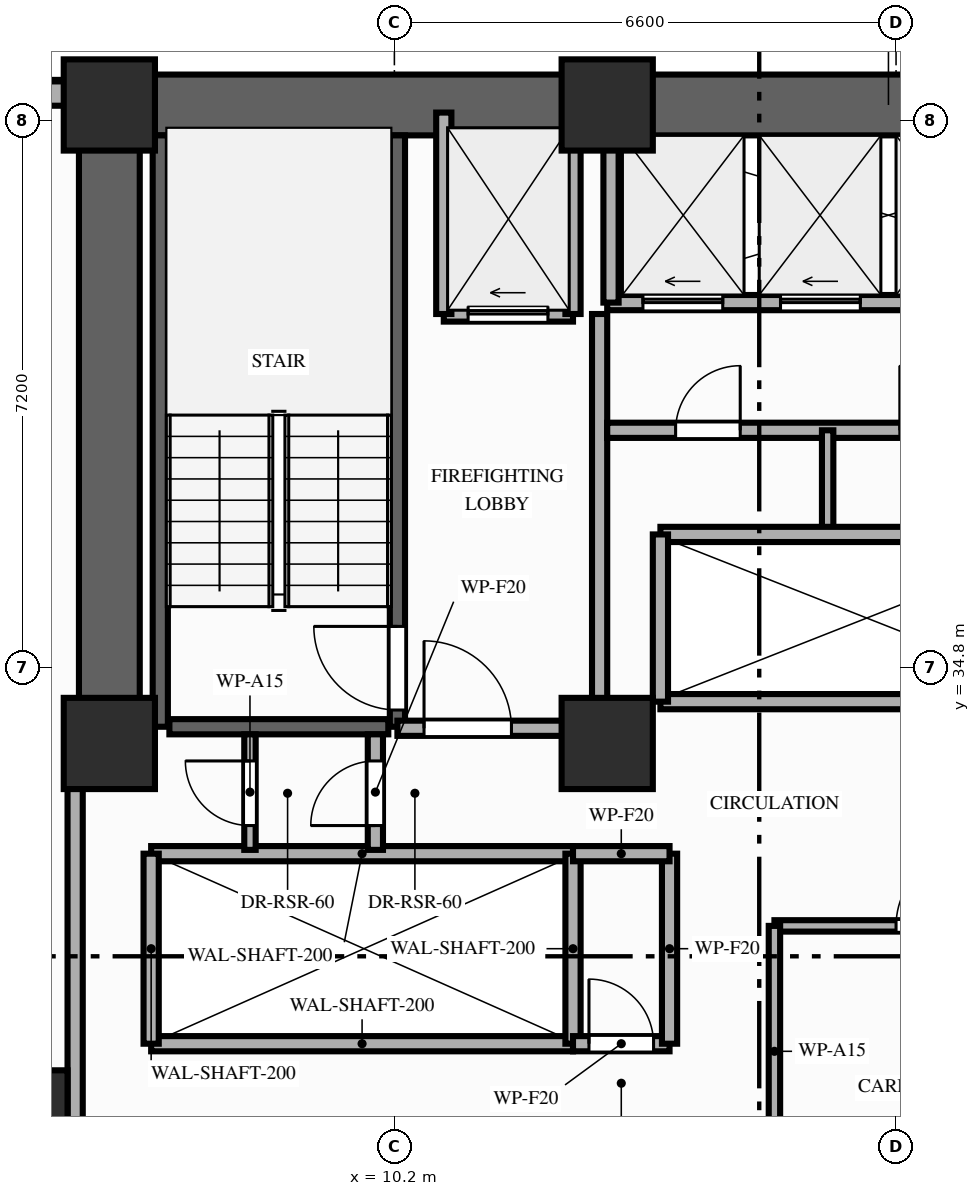
"""IFC4 building model, lengths in metres.
Left out: names, types, materials, properties, quantities, classifications, styles, units other than length and angle.
Written with IfcOpenShell. Run it as: python <this file> out.ifc"""

import sys

from ifc_helpers import new_model, si_unit, direction, frame, frame_2d, origin, origin_2d, place, context, subcontext, project, spatial, rectangle, extrude, element, fill, save


model = new_model("IFC4")
c1 = context("Model", 3, precision=1e-05, world=origin(), true_north=direction((0.0, 1.0)))
c2 = subcontext(c1, "Body", "Model", "MODEL_VIEW")
j1 = project(units=[si_unit("LENGTHUNIT", "METRE"), si_unit("PLANEANGLEUNIT", "RADIAN")], contexts=[c1])
p1 = place(None, origin())
s1 = spatial("IfcSite", under=j1, at=p1, CompositionType="ELEMENT")
p2 = place(p1, origin())
s2 = spatial("IfcBuilding", under=s1, at=p2, CompositionType="ELEMENT")
p3 = place(p2, frame((0.0, 0.0, 33.4)))
s3 = spatial("IfcBuildingStorey", under=s2, at=p3, CompositionType="ELEMENT", Elevation=33.4)
for number, where, z_axis, x_axis in (
    (1, (6.45, 33.8, 0.0), (0.0, 0.0, 1.0), (1.0, 0.0, 0.0)),
    (2, (13.0, 33.8, 0.0), (0.0, 0.0, 1.0), (1.0, 0.0, 0.0)),
    (3, (6.45, 42.2, 0.0), (0.0, 0.0, 1.0), (1.0, 0.0, 0.0)),
    (4, (13.0, 42.2, 0.0), (0.0, 0.0, 1.0), (1.0, 0.0, 0.0)),
):
    element("IfcColumn", number, at=place(p3, frame(where, z_axis=z_axis, x_axis=x_axis)), inside=s3, PredefinedType="COLUMN", context=c2, shape_type="SweptSolid", body=[
        extrude(rectangle(XDim=1.2, YDim=1.2, at=origin_2d()), origin(), (0.0, 0.0, 1.0), 3.2),
    ])
p4 = place(p3, frame((5.4, 28.8, 0.0), z_axis=(0.0, 0.0, 1.0), x_axis=(1.0, 0.0, 0.0)))
e5 = element("IfcColumn", 5, at=p4, inside=s3, PredefinedType="COLUMN", context=c2, shape_type="SweptSolid", body=[
    extrude(rectangle(XDim=1.0, YDim=1.4, at=origin_2d()), origin(), (0.0, 0.0, 1.0), 3.2),
])
p5 = place(p3, frame((6.0, 42.35, 0.0), z_axis=(0.0, 0.0, 1.0), x_axis=(-1.0, 0.0, 0.0)))
e6 = element("IfcWall", 6, at=p5, inside=s3, PredefinedType="STANDARD", context=c2, shape_type="SweptSolid", body=[
    extrude(rectangle(XDim=2.0, YDim=0.32, at=frame_2d((1.0, 0.0))), origin(), (0.0, 0.0, 1.0), 3.02),
])
p6 = place(p3, frame((6.45, 42.2, 0.0), z_axis=(0.0, 0.0, 1.0), x_axis=(1.0, 0.0, 0.0)))
e7 = element("IfcWall", 7, at=p6, inside=s3, PredefinedType="SHEAR", context=c2, shape_type="SweptSolid", body=[
    extrude(rectangle(XDim=20.45, YDim=0.8, at=frame_2d((10.225, 0.0))), origin(), (0.0, 0.0, 1.0), 3.02),
])
p7 = place(p3, frame((6.45, 33.8, 0.0), z_axis=(0.0, 0.0, 1.0), x_axis=(0.0, 1.0, 0.0)))
e8 = element("IfcWall", 8, at=p7, inside=s3, PredefinedType="SHEAR", context=c2, shape_type="SweptSolid", body=[
    extrude(rectangle(XDim=7.95, YDim=0.8, at=frame_2d((3.975, 0.0))), origin(), (0.0, 0.0, 1.0), 3.02),
])
p8 = place(p3, frame((7.12, 34.02, 0.0), z_axis=(0.0, 0.0, 1.0), x_axis=(0.0, 1.0, 0.0)))
e9 = element("IfcWall", 9, at=p8, inside=s3, PredefinedType="SHEAR", context=c2, shape_type="SweptSolid", body=[
    extrude(rectangle(XDim=7.78, YDim=0.2, at=frame_2d((3.89, 0.0))), origin(), (0.0, 0.0, 1.0), 3.02),
])
p9 = place(p3, frame((10.24, 34.02, 0.0), z_axis=(0.0, 0.0, 1.0), x_axis=(0.0, 1.0, 0.0)))
e10 = element("IfcWall", 10, at=p9, inside=s3, PredefinedType="SHEAR", context=c2, shape_type="SweptSolid", body=[
    extrude(rectangle(XDim=7.78, YDim=0.2, at=frame_2d((3.89, 0.0))), origin(), (0.0, 0.0, 1.0), 3.02),
])
p10 = place(p9, frame((0.22, 0.0, 0.0)))
e11 = element("IfcOpeningElement", 11, at=p10, cuts=e10, PredefinedType="OPENING", context=c2, shape_type="SweptSolid", body=[
    extrude(rectangle(XDim=1.1, YDim=2.15, at=frame_2d((0.55, 1.075))), frame((0.0, 0.11, 0.0), z_axis=(0.0, -1.0, 0.0), x_axis=(1.0, 0.0, 0.0)), (0.0, 0.0, 1.0), 0.22),
])
p11 = place(p3, frame((7.24, 34.02, 0.0), z_axis=(0.0, 0.0, 1.0), x_axis=(1.0, 0.0, 0.0)))
e12 = element("IfcWall", 12, at=p11, inside=s3, PredefinedType="SHEAR", context=c2, shape_type="SweptSolid", body=[
    extrude(rectangle(XDim=2.88, YDim=0.2, at=frame_2d((1.44, 0.0))), origin(), (0.0, 0.0, 1.0), 3.02),
])
for number, where, z_axis, x_axis in (
    (13, (7.0, 29.85, 0.0), (0.0, 0.0, 1.0), (1.0, 0.0, 0.0)),
    (14, (7.0, 32.35, 0.0), (0.0, 0.0, 1.0), (1.0, 0.0, 0.0)),
):
    element("IfcWall", number, at=place(p3, frame(where, z_axis=z_axis, x_axis=x_axis)), inside=s3, PredefinedType="MOVABLE", context=c2, shape_type="SweptSolid", body=[
        extrude(rectangle(XDim=5.55, YDim=0.2, at=frame_2d((2.775, 0.0))), origin(), (0.0, 0.0, 1.0), 3.02),
    ])
for number, where, z_axis, x_axis in (
    (15, (7.0, 29.85, 0.0), (0.0, 0.0, 1.0), (0.0, 1.0, 0.0)),
    (16, (12.55, 29.85, 0.0), (0.0, 0.0, 1.0), (0.0, 1.0, 0.0)),
):
    element("IfcWall", number, at=place(p3, frame(where, z_axis=z_axis, x_axis=x_axis)), inside=s3, PredefinedType="MOVABLE", context=c2, shape_type="SweptSolid", body=[
        extrude(rectangle(XDim=2.5, YDim=0.2, at=frame_2d((1.25, 0.0))), origin(), (0.0, 0.0, 1.0), 3.02),
    ])
p12 = place(p3, frame((10.85, 39.45, 0.0), z_axis=(0.0, 0.0, 1.0), x_axis=(1.0, 0.0, 0.0)))
e17 = element("IfcWall", 17, at=p12, inside=s3, PredefinedType="MOVABLE", context=c2, shape_type="SweptSolid", body=[
    extrude(rectangle(XDim=1.7, YDim=0.2, at=frame_2d((0.85, 0.0))), origin(), (0.0, 0.0, 1.0), 3.02),
])
p13 = place(p12, frame((0.32, 0.0, 0.0)))
e18 = element("IfcOpeningElement", 18, at=p13, cuts=e17, PredefinedType="OPENING", context=c2, shape_type="SweptSolid", body=[
    extrude(rectangle(XDim=1.05, YDim=2.15, at=frame_2d((0.525, 1.075))), frame((0.0, 0.11, 0.0), z_axis=(0.0, -1.0, 0.0), x_axis=(1.0, 0.0, 0.0)), (0.0, 0.0, 1.0), 0.22),
])
for number, where, z_axis, x_axis in (
    (19, (10.85, 39.45, 0.0), (0.0, 0.0, 1.0), (0.0, 1.0, 0.0)),
    (20, (12.55, 39.45, 0.0), (0.0, 0.0, 1.0), (0.0, 1.0, 0.0)),
):
    element("IfcWall", number, at=place(p3, frame(where, z_axis=z_axis, x_axis=x_axis)), inside=s3, PredefinedType="MOVABLE", context=c2, shape_type="SweptSolid", body=[
        extrude(rectangle(XDim=2.65, YDim=0.2, at=frame_2d((1.325, 0.0))), origin(), (0.0, 0.0, 1.0), 2.4),
    ])
p14 = place(p3, frame((12.9, 34.0, 0.0), z_axis=(0.0, 0.0, 1.0), x_axis=(0.0, 1.0, 0.0)))
e21 = element("IfcWall", 21, at=p14, inside=s3, PredefinedType="PARTITIONING", context=c2, shape_type="SweptSolid", body=[
    extrude(rectangle(XDim=5.45, YDim=0.2, at=frame_2d((2.725, 0.0))), origin(), (0.0, 0.0, 1.0), 2.4),
])
p15 = place(p3, frame((10.24, 34.0, 0.0), z_axis=(0.0, 0.0, 1.0), x_axis=(1.0, 0.0, 0.0)))
e22 = element("IfcWall", 22, at=p15, inside=s3, PredefinedType="PARTITIONING", context=c2, shape_type="SweptSolid", body=[
    extrude(rectangle(XDim=2.66, YDim=0.2, at=frame_2d((1.33, 0.0))), origin(), (0.0, 0.0, 1.0), 2.4),
])
p16 = place(p15, frame((0.35, 0.0, 0.0)))
e23 = element("IfcOpeningElement", 23, at=p16, cuts=e22, PredefinedType="OPENING", context=c2, shape_type="SweptSolid", body=[
    extrude(rectangle(XDim=1.15, YDim=2.15, at=frame_2d((0.575, 1.075))), frame((0.0, 0.11, 0.0), z_axis=(0.0, -1.0, 0.0), x_axis=(1.0, 0.0, 0.0)), (0.0, 0.0, 1.0), 0.22),
])
p17 = place(p3, frame((9.95, 32.4, 0.0), z_axis=(0.0, 0.0, 1.0), x_axis=(0.0, 1.0, 0.0)))
e24 = element("IfcWall", 24, at=p17, inside=s3, PredefinedType="PARTITIONING", context=c2, shape_type="SweptSolid", body=[
    extrude(rectangle(XDim=1.52, YDim=0.2, at=frame_2d((0.76, 0.0))), origin(), (0.0, 0.0, 1.0), 2.4),
])
p18 = place(p17, frame((0.32, 0.0, 0.0)))
e25 = element("IfcOpeningElement", 25, at=p18, cuts=e24, PredefinedType="OPENING", context=c2, shape_type="SweptSolid", body=[
    extrude(rectangle(XDim=0.85, YDim=2.05, at=frame_2d((0.425, 1.025))), frame((0.0, 0.11, 0.0), z_axis=(0.0, -1.0, 0.0), x_axis=(1.0, 0.0, 0.0)), (0.0, 0.0, 1.0), 0.22),
])
p19 = place(p3, frame((8.3, 32.4, 0.0), z_axis=(0.0, 0.0, 1.0), x_axis=(0.0, 1.0, 0.0)))
e26 = element("IfcWall", 26, at=p19, inside=s3, PredefinedType="PARTITIONING", context=c2, shape_type="SweptSolid", body=[
    extrude(rectangle(XDim=1.52, YDim=0.15, at=frame_2d((0.76, 0.0))), origin(), (0.0, 0.0, 1.0), 2.4),
])
p20 = place(p19, frame((0.32, 0.0, 0.0)))
e27 = element("IfcOpeningElement", 27, at=p20, cuts=e26, PredefinedType="OPENING", context=c2, shape_type="SweptSolid", body=[
    extrude(rectangle(XDim=0.85, YDim=2.05, at=frame_2d((0.425, 1.025))), frame((0.0, 0.085, 0.0), z_axis=(0.0, -1.0, 0.0), x_axis=(1.0, 0.0, 0.0)), (0.0, 0.0, 1.0), 0.17),
])
p21 = place(p3, frame((12.55, 29.85, 0.0), z_axis=(0.0, 0.0, 1.0), x_axis=(1.0, 0.0, 0.0)))
e28 = element("IfcWall", 28, at=p21, inside=s3, PredefinedType="PARTITIONING", context=c2, shape_type="SweptSolid", body=[
    extrude(rectangle(XDim=1.27, YDim=0.2, at=frame_2d((0.635, 0.0))), origin(), (0.0, 0.0, 1.0), 3.02),
])
p22 = place(p21, frame((0.21, 0.0, 0.0)))
e29 = element("IfcOpeningElement", 29, at=p22, cuts=e28, PredefinedType="OPENING", context=c2, shape_type="SweptSolid", body=[
    extrude(rectangle(XDim=0.85, YDim=2.05, at=frame_2d((0.425, 1.025))), frame((0.0, 0.11, 0.0), z_axis=(0.0, -1.0, 0.0), x_axis=(1.0, 0.0, 0.0)), (0.0, 0.0, 1.0), 0.22),
])
p23 = place(p3, frame((13.82, 29.85, 0.0), z_axis=(0.0, 0.0, 1.0), x_axis=(0.0, 1.0, 0.0)))
e30 = element("IfcWall", 30, at=p23, inside=s3, PredefinedType="PARTITIONING", context=c2, shape_type="SweptSolid", body=[
    extrude(rectangle(XDim=2.5, YDim=0.2, at=frame_2d((1.25, 0.0))), origin(), (0.0, 0.0, 1.0), 3.02),
])
p24 = place(p3, frame((12.55, 32.35, 0.0), z_axis=(0.0, 0.0, 1.0), x_axis=(1.0, 0.0, 0.0)))
e31 = element("IfcWall", 31, at=p24, inside=s3, PredefinedType="PARTITIONING", context=c2, shape_type="SweptSolid", body=[
    extrude(rectangle(XDim=1.27, YDim=0.2, at=frame_2d((0.635, 0.0))), origin(), (0.0, 0.0, 1.0), 3.02),
])
p25 = place(p3, frame((13.0, 39.6, 0.0), z_axis=(0.0, 0.0, 1.0), x_axis=(1.0, 0.0, 0.0)))
e32 = element("IfcWall", 32, at=p25, inside=s3, PredefinedType="MOVABLE", context=c2, shape_type="SweptSolid", body=[
    extrude(rectangle(XDim=7.4, YDim=0.2, at=frame_2d((3.7, 0.0))), origin(), (0.0, 0.0, 1.0), 3.02),
])
p26 = place(p25, frame((0.47, 0.0, 0.0)))
e33 = element("IfcOpeningElement", 33, at=p26, cuts=e32, PredefinedType="OPENING", context=c2, shape_type="SweptSolid", body=[
    extrude(rectangle(XDim=1.05, YDim=2.15, at=frame_2d((0.525, 1.075))), frame((0.0, 0.11, 0.0), z_axis=(0.0, -1.0, 0.0), x_axis=(1.0, 0.0, 0.0)), (0.0, 0.0, 1.0), 0.22),
])
p27 = place(p25, frame((2.28, 0.0, 0.0)))
e34 = element("IfcOpeningElement", 34, at=p27, cuts=e32, PredefinedType="OPENING", context=c2, shape_type="SweptSolid", body=[
    extrude(rectangle(XDim=1.05, YDim=2.15, at=frame_2d((0.525, 1.075))), frame((0.0, 0.11, 0.0), z_axis=(0.0, -1.0, 0.0), x_axis=(1.0, 0.0, 0.0)), (0.0, 0.0, 1.0), 0.22),
])
p28 = place(p25, frame((4.08, 0.0, 0.0)))
e35 = element("IfcOpeningElement", 35, at=p28, cuts=e32, PredefinedType="OPENING", context=c2, shape_type="SweptSolid", body=[
    extrude(rectangle(XDim=1.05, YDim=2.15, at=frame_2d((0.525, 1.075))), frame((0.0, 0.11, 0.0), z_axis=(0.0, -1.0, 0.0), x_axis=(1.0, 0.0, 0.0)), (0.0, 0.0, 1.0), 0.22),
])
p29 = place(p25, frame((5.88, 0.0, 0.0)))
e36 = element("IfcOpeningElement", 36, at=p29, cuts=e32, PredefinedType="OPENING", context=c2, shape_type="SweptSolid", body=[
    extrude(rectangle(XDim=1.05, YDim=2.15, at=frame_2d((0.525, 1.075))), frame((0.0, 0.11, 0.0), z_axis=(0.0, -1.0, 0.0), x_axis=(1.0, 0.0, 0.0)), (0.0, 0.0, 1.0), 0.22),
])
p30 = place(p3, frame((13.05, 39.6, 0.0), z_axis=(0.0, 0.0, 1.0), x_axis=(0.0, 1.0, 0.0)))
e37 = element("IfcWall", 37, at=p30, inside=s3, PredefinedType="MOVABLE", context=c2, shape_type="SweptSolid", body=[
    extrude(rectangle(XDim=2.18, YDim=0.2, at=frame_2d((1.09, 0.0))), origin(), (0.0, 0.0, 1.0), 3.02),
])
p31 = place(p3, frame((13.0, 37.92, 0.0), z_axis=(0.0, 0.0, 1.0), x_axis=(1.0, 0.0, 0.0)))
e38 = element("IfcWall", 38, at=p31, inside=s3, PredefinedType="PARTITIONING", context=c2, shape_type="SweptSolid", body=[
    extrude(rectangle(XDim=5.95, YDim=0.2, at=frame_2d((2.975, 0.0))), origin(), (0.0, 0.0, 1.0), 3.02),
])
p32 = place(p31, frame((0.9, 0.0, 0.0)))
e39 = element("IfcOpeningElement", 39, at=p32, cuts=e38, PredefinedType="OPENING", context=c2, shape_type="SweptSolid", body=[
    extrude(rectangle(XDim=0.85, YDim=2.05, at=frame_2d((0.425, 1.025))), frame((0.0, 0.11, 0.0), z_axis=(0.0, -1.0, 0.0), x_axis=(1.0, 0.0, 0.0)), (0.0, 0.0, 1.0), 0.22),
])
p33 = place(p31, frame((3.85, 0.0, 0.0)))
e40 = element("IfcOpeningElement", 40, at=p33, cuts=e38, PredefinedType="OPENING", context=c2, shape_type="SweptSolid", body=[
    extrude(rectangle(XDim=0.85, YDim=2.05, at=frame_2d((0.425, 1.025))), frame((0.0, 0.11, 0.0), z_axis=(0.0, -1.0, 0.0), x_axis=(1.0, 0.0, 0.0)), (0.0, 0.0, 1.0), 0.22),
])
p34 = place(p3, frame((15.9, 36.6, 0.0), z_axis=(0.0, 0.0, 1.0), x_axis=(0.0, 1.0, 0.0)))
e41 = element("IfcWall", 41, at=p34, inside=s3, PredefinedType="PARTITIONING", context=c2, shape_type="SweptSolid", body=[
    extrude(rectangle(XDim=1.32, YDim=0.15, at=frame_2d((0.66, 0.0))), origin(), (0.0, 0.0, 1.0), 3.02),
])
for number, where, z_axis, x_axis in (
    (42, (13.7, 34.35, 0.0), (0.0, 0.0, 1.0), (1.0, 0.0, 0.0)),
    (43, (13.7, 36.55, 0.0), (0.0, 0.0, 1.0), (1.0, 0.0, 0.0)),
):
    element("IfcWall", number, at=place(p3, frame(where, z_axis=z_axis, x_axis=x_axis)), inside=s3, PredefinedType="MOVABLE", context=c2, shape_type="SweptSolid", body=[
        extrude(rectangle(XDim=5.42, YDim=0.2, at=frame_2d((2.71, 0.0))), origin(), (0.0, 0.0, 1.0), 3.02),
    ])
p35 = place(p3, frame((13.7, 34.35, 0.0), z_axis=(0.0, 0.0, 1.0), x_axis=(0.0, 1.0, 0.0)))
e44 = element("IfcWall", 44, at=p35, inside=s3, PredefinedType="MOVABLE", context=c2, shape_type="SweptSolid", body=[
    extrude(rectangle(XDim=2.2, YDim=0.2, at=frame_2d((1.1, 0.0))), origin(), (0.0, 0.0, 1.0), 3.02),
])
p36 = place(p3, frame((6.0, 28.1, 0.0), z_axis=(0.0, 0.0, 1.0), x_axis=(0.0, 1.0, 0.0)))
e45 = element("IfcWall", 45, at=p36, inside=s3, PredefinedType="PARTITIONING", context=c2, shape_type="SweptSolid", body=[
    extrude(rectangle(XDim=5.58, YDim=0.2, at=frame_2d((2.79, 0.0))), origin(), (0.0, 0.0, 1.0), 2.4),
])
p37 = place(p3, frame((15.2, 31.4, 0.0), z_axis=(0.0, 0.0, 1.0), x_axis=(1.0, 0.0, 0.0)))
e46 = element("IfcWall", 46, at=p37, inside=s3, PredefinedType="PARTITIONING", context=c2, shape_type="SweptSolid", body=[
    extrude(rectangle(XDim=5.1, YDim=0.15, at=frame_2d((2.55, 0.0))), origin(), (0.0, 0.0, 1.0), 2.4),
])
p38 = place(p37, frame((1.6, 0.0, 0.0)))
e47 = element("IfcOpeningElement", 47, at=p38, cuts=e46, PredefinedType="OPENING", context=c2, shape_type="SweptSolid", body=[
    extrude(rectangle(XDim=1.0, YDim=2.15, at=frame_2d((0.5, 1.075))), frame((0.0, 0.085, 0.0), z_axis=(0.0, -1.0, 0.0), x_axis=(1.0, 0.0, 0.0)), (0.0, 0.0, 1.0), 0.17),
])
p39 = place(p3, frame((15.2, 28.1, 0.0), z_axis=(0.0, 0.0, 1.0), x_axis=(0.0, 1.0, 0.0)))
e48 = element("IfcWall", 48, at=p39, inside=s3, PredefinedType="PARTITIONING", context=c2, shape_type="SweptSolid", body=[
    extrude(rectangle(XDim=3.3, YDim=0.15, at=frame_2d((1.65, 0.0))), origin(), (0.0, 0.0, 1.0), 2.4),
])
p40 = place(p10, origin())
e49 = element("IfcDoor", 49, at=p40, inside=s3, OperationType="SINGLE_SWING_RIGHT", PredefinedType="DOOR", context=c2, shape_type="SweptSolid", body=[
    extrude(rectangle(XDim=1.1, YDim=2.15, at=frame_2d((0.55, 1.075))), frame((0.0, 0.025, 0.0), z_axis=(0.0, -1.0, 0.0), x_axis=(1.0, 0.0, 0.0)), (0.0, 0.0, 1.0), 0.05),
])
fill(e11, e49)
p41 = place(p13, origin())
e50 = element("IfcDoor", 50, at=p41, inside=s3, OperationType="SLIDING_TO_LEFT", PredefinedType="DOOR", context=c2, shape_type="SweptSolid", body=[
    extrude(rectangle(XDim=1.05, YDim=2.15, at=frame_2d((0.525, 1.075))), frame((0.0, 0.025, 0.0), z_axis=(0.0, -1.0, 0.0), x_axis=(1.0, 0.0, 0.0)), (0.0, 0.0, 1.0), 0.05),
])
fill(e18, e50)
p42 = place(p16, origin())
e51 = element("IfcDoor", 51, at=p42, inside=s3, OperationType="SINGLE_SWING_LEFT", PredefinedType="DOOR", context=c2, shape_type="SweptSolid", body=[
    extrude(rectangle(XDim=1.15, YDim=2.15, at=frame_2d((0.575, 1.075))), frame((0.0, 0.025, 0.0), z_axis=(0.0, -1.0, 0.0), x_axis=(1.0, 0.0, 0.0)), (0.0, 0.0, 1.0), 0.05),
])
fill(e23, e51)
p43 = place(p18, origin())
e52 = element("IfcDoor", 52, at=p43, inside=s3, OperationType="SINGLE_SWING_LEFT", PredefinedType="DOOR", context=c2, shape_type="SweptSolid", body=[
    extrude(rectangle(XDim=0.85, YDim=2.05, at=frame_2d((0.425, 1.025))), frame((0.0, 0.025, 0.0), z_axis=(0.0, -1.0, 0.0), x_axis=(1.0, 0.0, 0.0)), (0.0, 0.0, 1.0), 0.05),
])
fill(e25, e52)
p44 = place(p20, origin())
e53 = element("IfcDoor", 53, at=p44, inside=s3, OperationType="SINGLE_SWING_RIGHT", PredefinedType="DOOR", context=c2, shape_type="SweptSolid", body=[
    extrude(rectangle(XDim=0.85, YDim=2.05, at=frame_2d((0.425, 1.025))), frame((0.0, 0.025, 0.0), z_axis=(0.0, -1.0, 0.0), x_axis=(1.0, 0.0, 0.0)), (0.0, 0.0, 1.0), 0.05),
])
fill(e27, e53)
p45 = place(p22, origin())
e54 = element("IfcDoor", 54, at=p45, inside=s3, OperationType="SINGLE_SWING_LEFT", PredefinedType="DOOR", context=c2, shape_type="SweptSolid", body=[
    extrude(rectangle(XDim=0.85, YDim=2.05, at=frame_2d((0.425, 1.025))), frame((0.0, 0.025, 0.0), z_axis=(0.0, -1.0, 0.0), x_axis=(1.0, 0.0, 0.0)), (0.0, 0.0, 1.0), 0.05),
])
fill(e29, e54)
p46 = place(p26, origin())
e55 = element("IfcDoor", 55, at=p46, inside=s3, OperationType="SLIDING_TO_LEFT", PredefinedType="DOOR", context=c2, shape_type="SweptSolid", body=[
    extrude(rectangle(XDim=1.05, YDim=2.15, at=frame_2d((0.525, 1.075))), frame((0.0, 0.025, 0.0), z_axis=(0.0, -1.0, 0.0), x_axis=(1.0, 0.0, 0.0)), (0.0, 0.0, 1.0), 0.05),
])
fill(e33, e55)
p47 = place(p27, origin())
e56 = element("IfcDoor", 56, at=p47, inside=s3, OperationType="SLIDING_TO_LEFT", PredefinedType="DOOR", context=c2, shape_type="SweptSolid", body=[
    extrude(rectangle(XDim=1.05, YDim=2.15, at=frame_2d((0.525, 1.075))), frame((0.0, 0.025, 0.0), z_axis=(0.0, -1.0, 0.0), x_axis=(1.0, 0.0, 0.0)), (0.0, 0.0, 1.0), 0.05),
])
fill(e34, e56)
p48 = place(p32, origin())
e57 = element("IfcDoor", 57, at=p48, inside=s3, OperationType="SINGLE_SWING_RIGHT", PredefinedType="DOOR", context=c2, shape_type="SweptSolid", body=[
    extrude(rectangle(XDim=0.85, YDim=2.05, at=frame_2d((0.425, 1.025))), frame((0.0, 0.025, 0.0), z_axis=(0.0, -1.0, 0.0), x_axis=(1.0, 0.0, 0.0)), (0.0, 0.0, 1.0), 0.05),
])
fill(e39, e57)
p49 = place(p33, origin())
e58 = element("IfcDoor", 58, at=p49, inside=s3, OperationType="SINGLE_SWING_LEFT", PredefinedType="DOOR", context=c2, shape_type="SweptSolid", body=[
    extrude(rectangle(XDim=0.85, YDim=2.05, at=frame_2d((0.425, 1.025))), frame((0.0, 0.025, 0.0), z_axis=(0.0, -1.0, 0.0), x_axis=(1.0, 0.0, 0.0)), (0.0, 0.0, 1.0), 0.05),
])
fill(e40, e58)
p50 = place(p38, origin())
e59 = element("IfcDoor", 59, at=p50, inside=s3, OperationType="SINGLE_SWING_RIGHT", PredefinedType="DOOR", context=c2, shape_type="SweptSolid", body=[
    extrude(rectangle(XDim=1.0, YDim=2.15, at=frame_2d((0.5, 1.075))), frame((0.0, 0.025, 0.0), z_axis=(0.0, -1.0, 0.0), x_axis=(1.0, 0.0, 0.0)), (0.0, 0.0, 1.0), 0.05),
])
fill(e47, e59)
save(model, sys.argv[1])
